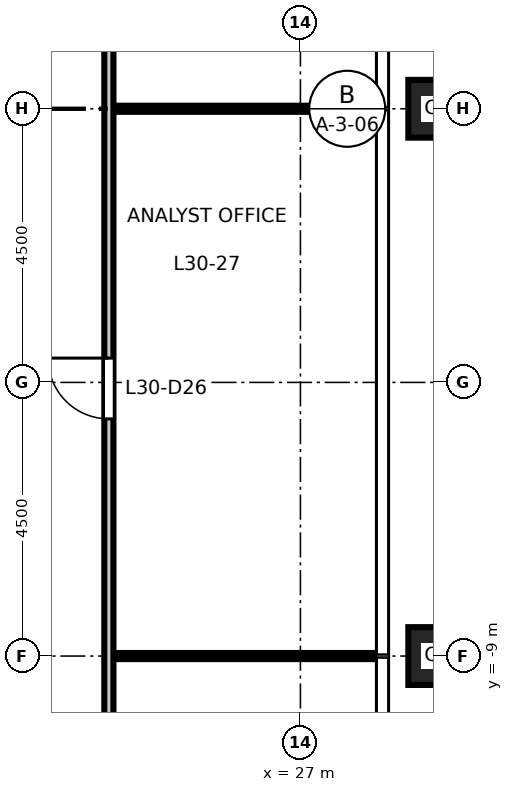
"""IFC4 building model, lengths in metres.
Left out: names, types, materials, properties, quantities, classifications, styles, units other than length and angle.
Written with IfcOpenShell. Run it as: python <this file> out.ifc"""

import sys

from ifc_helpers import new_model, si_unit, direction, frame, frame_2d, origin, origin_2d, place, context, subcontext, project, spatial, rectangle, hollow_rectangle, extrude, element, fill, save


model = new_model("IFC4")
c1 = context("Model", 3, precision=1e-05, world=origin(), true_north=direction((0.0, 1.0)))
c2 = subcontext(c1, "Body", "Model", "MODEL_VIEW")
j1 = project(units=[si_unit("LENGTHUNIT", "METRE"), si_unit("PLANEANGLEUNIT", "RADIAN")], contexts=[c1])
p1 = place(None, origin())
s1 = spatial("IfcSite", under=j1, at=p1, CompositionType="ELEMENT")
p2 = place(p1, origin())
s2 = spatial("IfcBuilding", under=s1, at=p2, CompositionType="ELEMENT")
p3 = place(p2, frame((0.0, 0.0, 140.7)))
s3 = spatial("IfcBuildingStorey", under=s2, at=p3, CompositionType="ELEMENT", Elevation=140.7)
for number, where, z_axis, x_axis in (
    (1, (29.25, -9.0, 0.0), (0.0, 0.0, 1.0), (1.0, 0.0, 0.0)),
    (2, (29.25, 0.0, 0.0), (0.0, 0.0, 1.0), (1.0, 0.0, 0.0)),
):
    element("IfcColumn", number, at=place(p3, frame(where, z_axis=z_axis, x_axis=x_axis)), inside=s3, PredefinedType="COLUMN", context=c2, shape_type="SweptSolid", body=[
        extrude(hollow_rectangle(XDim=0.95, YDim=0.95, WallThickness=0.055, at=origin_2d()), origin(), (0.0, 0.0, 1.0), 4.5),
    ])
for number, where, z_axis, x_axis in (
    (3, (23.925, -9.0, 0.0), (0.0, 0.0, 1.0), (1.0, 0.0, 0.0)),
    (4, (23.925, 0.0, 0.0), (0.0, 0.0, 1.0), (1.0, 0.0, 0.0)),
):
    element("IfcWall", number, at=place(p3, frame(where, z_axis=z_axis, x_axis=x_axis)), inside=s3, PredefinedType="PARTITIONING", context=c2, shape_type="SweptSolid", body=[
        extrude(rectangle(XDim=4.335, YDim=0.1, at=frame_2d((2.167, 0.0))), origin(), (0.0, 0.0, 1.0), 4.35),
    ])
p4 = place(p3, frame((23.85, -18.925, 0.0), z_axis=(0.0, 0.0, 1.0), x_axis=(0.0, 1.0, 0.0)))
e5 = element("IfcWall", 5, at=p4, inside=s3, PredefinedType="PARTITIONING", context=c2, shape_type="SweptSolid", body=[
    extrude(rectangle(XDim=37.85, YDim=0.15, at=frame_2d((18.925, 0.0))), origin(), (0.0, 0.0, 1.0), 4.35),
])
p5 = place(p4, frame((4.325, 0.0, 0.0)))
e6 = element("IfcOpeningElement", 6, at=p5, cuts=e5, PredefinedType="OPENING", context=c2, shape_type="SweptSolid", body=[
    extrude(rectangle(XDim=1.0, YDim=2.1, at=frame_2d((0.5, 1.05))), frame((0.0, 0.085, 0.0), z_axis=(0.0, -1.0, 0.0), x_axis=(1.0, 0.0, 0.0)), (0.0, 0.0, 1.0), 0.17),
])
p6 = place(p4, frame((13.825, 0.0, 0.0)))
e7 = element("IfcOpeningElement", 7, at=p6, cuts=e5, PredefinedType="OPENING", context=c2, shape_type="SweptSolid", body=[
    extrude(rectangle(XDim=1.0, YDim=2.1, at=frame_2d((0.5, 1.05))), frame((0.0, 0.085, 0.0), z_axis=(0.0, -1.0, 0.0), x_axis=(1.0, 0.0, 0.0)), (0.0, 0.0, 1.0), 0.17),
])
p7 = place(p4, frame((22.825, 0.0, 0.0)))
e8 = element("IfcOpeningElement", 8, at=p7, cuts=e5, PredefinedType="OPENING", context=c2, shape_type="SweptSolid", body=[
    extrude(rectangle(XDim=1.0, YDim=2.1, at=frame_2d((0.5, 1.05))), frame((0.0, 0.085, 0.0), z_axis=(0.0, -1.0, 0.0), x_axis=(1.0, 0.0, 0.0)), (0.0, 0.0, 1.0), 0.17),
])
p8 = place(p4, frame((32.325, 0.0, 0.0)))
e9 = element("IfcOpeningElement", 9, at=p8, cuts=e5, PredefinedType="OPENING", context=c2, shape_type="SweptSolid", body=[
    extrude(rectangle(XDim=1.0, YDim=2.1, at=frame_2d((0.5, 1.05))), frame((0.0, 0.085, 0.0), z_axis=(0.0, -1.0, 0.0), x_axis=(1.0, 0.0, 0.0)), (0.0, 0.0, 1.0), 0.17),
])
p9 = place(p6, origin())
e10 = element("IfcDoor", 10, at=p9, inside=s3, OperationType="SINGLE_SWING_RIGHT", PredefinedType="DOOR", context=c2, shape_type="SweptSolid", body=[
    extrude(rectangle(XDim=1.0, YDim=2.1, at=frame_2d((0.5, 1.05))), frame((0.0, 0.025, 0.0), z_axis=(0.0, -1.0, 0.0), x_axis=(1.0, 0.0, 0.0)), (0.0, 0.0, 1.0), 0.05),
])
fill(e7, e10)
save(model, sys.argv[1])
